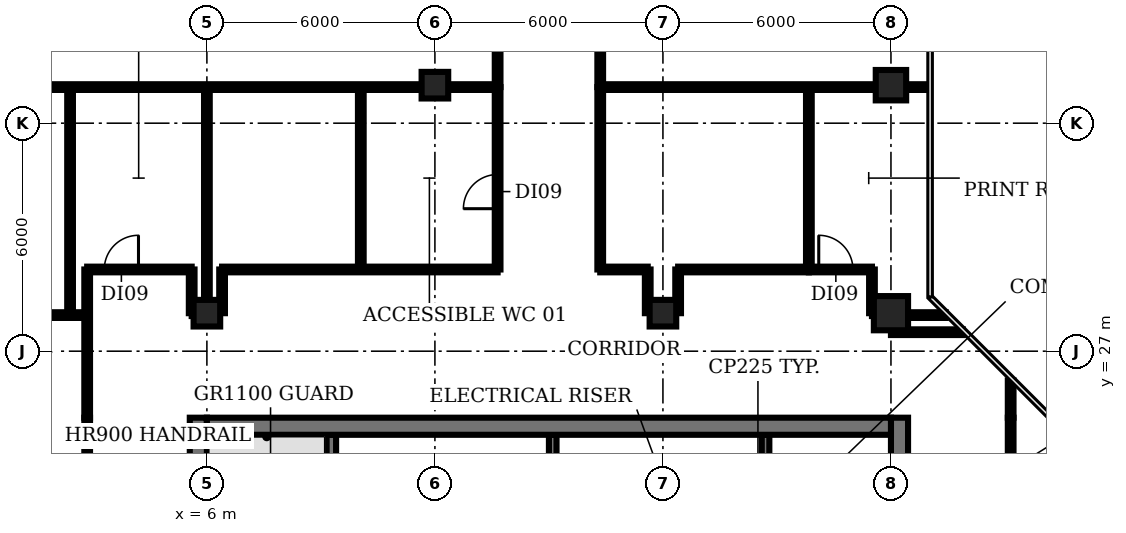
"""IFC4 building model, lengths in metres.
Left out: names, types, materials, properties, quantities, classifications, styles, units other than length and angle.
Written with IfcOpenShell. Run it as: python <this file> out.ifc"""

import sys

from ifc_helpers import new_model, si_unit, direction, frame, frame_2d, origin, origin_2d, place, context, subcontext, project, spatial, rectangle, circle, extrude, element, fill, save


model = new_model("IFC4")
c1 = context("Model", 3, precision=1e-05, world=origin(), true_north=direction((0.0, 1.0)))
c2 = subcontext(c1, "Body", "Model", "MODEL_VIEW")
j1 = project(units=[si_unit("LENGTHUNIT", "METRE"), si_unit("PLANEANGLEUNIT", "RADIAN")], contexts=[c1])
p1 = place(None, origin())
s1 = spatial("IfcSite", under=j1, at=p1, CompositionType="ELEMENT")
p2 = place(p1, origin())
s2 = spatial("IfcBuilding", under=s1, at=p2, CompositionType="ELEMENT")
p3 = place(p2, frame((0.0, 0.0, 247.4)))
s3 = spatial("IfcBuildingStorey", under=s2, at=p3, CompositionType="ELEMENT", Elevation=247.4)
for number, where, z_axis, x_axis in (
    (1, (6.0, 28.0, 0.0), (0.0, 0.0, 1.0), (1.0, 0.0, 0.0)),
    (2, (12.0, 34.0, 0.0), (0.0, 0.0, 1.0), (1.0, 0.0, 0.0)),
    (3, (18.0, 28.0, 0.0), (0.0, 0.0, 1.0), (1.0, 0.0, 0.0)),
):
    element("IfcColumn", number, at=place(p3, frame(where, z_axis=z_axis, x_axis=x_axis)), inside=s3, PredefinedType="COLUMN", context=c2, shape_type="SweptSolid", body=[
        extrude(rectangle(XDim=0.7, YDim=0.7, at=origin_2d()), origin(), (0.0, 0.0, 1.0), 3.85),
    ])
p4 = place(p3, frame((24.0, 28.0, 0.0), z_axis=(0.0, 0.0, 1.0), x_axis=(1.0, 0.0, 0.0)))
e4 = element("IfcColumn", 4, at=p4, inside=s3, PredefinedType="COLUMN", context=c2, shape_type="SweptSolid", body=[
    extrude(circle(Radius=0.45, at=origin_2d()), origin(), (0.0, 0.0, 1.0), 3.85),
])
p5 = place(p3, frame((24.0, 34.0, 0.0), z_axis=(0.0, 0.0, 1.0), x_axis=(1.0, 0.0, 0.0)))
e5 = element("IfcColumn", 5, at=p5, inside=s3, PredefinedType="COLUMN", context=c2, shape_type="SweptSolid", body=[
    extrude(rectangle(XDim=0.8, YDim=0.8, at=origin_2d()), origin(), (0.0, 0.0, 1.0), 3.85),
])
p6 = place(p3, frame((9.275, 18.375, 0.0), z_axis=(0.0, 0.0, 1.0), x_axis=(0.0, 1.0, 0.0)))
e6 = element("IfcWall", 6, at=p6, inside=s3, PredefinedType="SHEAR", context=c2, shape_type="SweptSolid", body=[
    extrude(rectangle(XDim=6.425, YDim=0.25, at=frame_2d((3.212, 0.0))), origin(), (0.0, 0.0, 1.0), 3.85),
])
for number, where, z_axis, x_axis in (
    (7, (15.1, 22.9, 0.0), (0.0, 0.0, 1.0), (0.0, 1.0, 0.0)),
    (8, (20.7, 22.9, 0.0), (0.0, 0.0, 1.0), (0.0, 1.0, 0.0)),
):
    element("IfcWall", number, at=place(p3, frame(where, z_axis=z_axis, x_axis=x_axis)), inside=s3, PredefinedType="SHEAR", context=c2, shape_type="SweptSolid", body=[
        extrude(rectangle(XDim=1.9, YDim=0.2, at=frame_2d((0.95, 0.0))), origin(), (0.0, 0.0, 1.0), 3.85),
    ])
p7 = place(p3, frame((5.775, 4.42, 0.0), z_axis=(0.0, 0.0, 1.0), x_axis=(0.0, 1.0, 0.0)))
e9 = element("IfcWall", 9, at=p7, inside=s3, PredefinedType="SHEAR", context=c2, shape_type="SweptSolid", body=[
    extrude(rectangle(XDim=20.83, YDim=0.45, at=frame_2d((10.415, 0.0))), origin(), (0.0, 0.0, 1.0), 3.85),
])
p8 = place(p7, frame((1.23, 0.0, 0.0)))
e10 = element("IfcOpeningElement", 10, at=p8, cuts=e9, PredefinedType="OPENING", context=c2, shape_type="SweptSolid", body=[
    extrude(rectangle(XDim=1.5, YDim=2.1, at=frame_2d((0.75, 1.05))), frame((0.0, 0.235, 0.0), z_axis=(0.0, -1.0, 0.0), x_axis=(1.0, 0.0, 0.0)), (0.0, 0.0, 1.0), 0.47),
])
p9 = place(p7, frame((7.68, 0.0, 0.0)))
e11 = element("IfcOpeningElement", 11, at=p9, cuts=e9, PredefinedType="OPENING", context=c2, shape_type="SweptSolid", body=[
    extrude(rectangle(XDim=1.2, YDim=2.1, at=frame_2d((0.6, 1.05))), frame((0.0, 0.235, 0.0), z_axis=(0.0, -1.0, 0.0), x_axis=(1.0, 0.0, 0.0)), (0.0, 0.0, 1.0), 0.47),
])
p10 = place(p7, frame((14.23, 0.0, 0.0)))
e12 = element("IfcOpeningElement", 12, at=p10, cuts=e9, PredefinedType="OPENING", context=c2, shape_type="SweptSolid", body=[
    extrude(rectangle(XDim=1.2, YDim=2.1, at=frame_2d((0.6, 1.05))), frame((0.0, 0.235, 0.0), z_axis=(0.0, -1.0, 0.0), x_axis=(1.0, 0.0, 0.0)), (0.0, 0.0, 1.0), 0.47),
])
p11 = place(p3, frame((24.225, 25.25, 0.0), z_axis=(0.0, 0.0, 1.0), x_axis=(0.0, -1.0, 0.0)))
e13 = element("IfcWall", 13, at=p11, inside=s3, PredefinedType="SHEAR", context=c2, shape_type="SweptSolid", body=[
    extrude(rectangle(XDim=20.83, YDim=0.45, at=frame_2d((10.415, 0.0))), origin(), (0.0, 0.0, 1.0), 3.85),
])
p12 = place(p11, frame((18.1, 0.0, 0.0)))
e14 = element("IfcOpeningElement", 14, at=p12, cuts=e13, PredefinedType="OPENING", context=c2, shape_type="SweptSolid", body=[
    extrude(rectangle(XDim=1.5, YDim=2.1, at=frame_2d((0.75, 1.05))), frame((0.0, 0.235, 0.0), z_axis=(0.0, -1.0, 0.0), x_axis=(1.0, 0.0, 0.0)), (0.0, 0.0, 1.0), 0.47),
])
p13 = place(p11, frame((12.0, 0.0, 0.0)))
e15 = element("IfcOpeningElement", 15, at=p13, cuts=e13, PredefinedType="OPENING", context=c2, shape_type="SweptSolid", body=[
    extrude(rectangle(XDim=0.9, YDim=2.1, at=frame_2d((0.45, 1.05))), frame((0.0, 0.235, 0.0), z_axis=(0.0, -1.0, 0.0), x_axis=(1.0, 0.0, 0.0)), (0.0, 0.0, 1.0), 0.47),
])
p14 = place(p11, frame((6.0, 0.0, 0.0)))
e16 = element("IfcOpeningElement", 16, at=p14, cuts=e13, PredefinedType="OPENING", context=c2, shape_type="SweptSolid", body=[
    extrude(rectangle(XDim=2.0, YDim=2.1, at=frame_2d((1.0, 1.05))), frame((0.0, 0.235, 0.0), z_axis=(0.0, -1.0, 0.0), x_axis=(1.0, 0.0, 0.0)), (0.0, 0.0, 1.0), 0.47),
])
p15 = place(p3, frame((6.0, 25.025, 0.0), z_axis=(0.0, 0.0, 1.0), x_axis=(1.0, 0.0, 0.0)))
e17 = element("IfcWall", 17, at=p15, inside=s3, PredefinedType="SHEAR", context=c2, shape_type="SweptSolid", body=[
    extrude(rectangle(XDim=18.0, YDim=0.45, at=frame_2d((9.0, 0.0))), origin(), (0.0, 0.0, 1.0), 3.85),
])
p16 = place(p3, frame((-1.69, 27.95, 0.0), z_axis=(0.0, 0.0, 1.0), x_axis=(1.0, 0.0, 0.0)))
e18 = element("IfcWall", 18, at=p16, inside=s3, PredefinedType="PARTITIONING", context=c2, shape_type="SweptSolid", body=[
    extrude(rectangle(XDim=4.54, YDim=0.15, at=frame_2d((2.27, 0.0))), origin(), (0.0, 0.0, 1.0), 2.88),
])
p17 = place(p3, frame((-1.22, 33.95, 0.0), z_axis=(0.0, 0.0, 1.0), x_axis=(1.0, 0.0, 0.0)))
e19 = element("IfcWall", 19, at=p17, inside=s3, PredefinedType="PARTITIONING", context=c2, shape_type="SweptSolid", body=[
    extrude(rectangle(XDim=14.87, YDim=0.15, at=frame_2d((7.435, 0.0))), origin(), (0.0, 0.0, 1.0), 2.88),
])
p18 = place(p3, frame((2.4, 27.95, 0.0), z_axis=(0.0, 0.0, 1.0), x_axis=(0.0, 1.0, 0.0)))
e20 = element("IfcWall", 20, at=p18, inside=s3, PredefinedType="PARTITIONING", context=c2, shape_type="SweptSolid", body=[
    extrude(rectangle(XDim=6.0, YDim=0.15, at=frame_2d((3.0, 0.0))), origin(), (0.0, 0.0, 1.0), 2.88),
])
p19 = place(p3, frame((2.85, 3.96, 0.0), z_axis=(0.0, 0.0, 1.0), x_axis=(0.0, 1.0, 0.0)))
e21 = element("IfcWall", 21, at=p19, inside=s3, PredefinedType="PARTITIONING", context=c2, shape_type="SweptSolid", body=[
    extrude(rectangle(XDim=21.29, YDim=0.15, at=frame_2d((10.645, 0.0))), origin(), (0.0, 0.0, 1.0), 2.88),
])
p20 = place(p19, frame((9.99, 0.0, 0.0)))
e22 = element("IfcOpeningElement", 22, at=p20, cuts=e21, PredefinedType="OPENING", context=c2, shape_type="SweptSolid", body=[
    extrude(rectangle(XDim=1.2, YDim=2.1, at=frame_2d((0.6, 1.05))), frame((0.0, 0.085, 0.0), z_axis=(0.0, -1.0, 0.0), x_axis=(1.0, 0.0, 0.0)), (0.0, 0.0, 1.0), 0.17),
])
p21 = place(p3, frame((2.85, 25.25, 0.0), z_axis=(0.0, 0.0, 1.0), x_axis=(0.0, 1.0, 0.0)))
e23 = element("IfcWall", 23, at=p21, inside=s3, PredefinedType="PARTITIONING", context=c2, shape_type="SweptSolid", body=[
    extrude(rectangle(XDim=3.9, YDim=0.15, at=frame_2d((1.95, 0.0))), origin(), (0.0, 0.0, 1.0), 2.88),
])
p22 = place(p3, frame((2.85, 29.15, 0.0), z_axis=(0.0, 0.0, 1.0), x_axis=(1.0, 0.0, 0.0)))
e24 = element("IfcWall", 24, at=p22, inside=s3, PredefinedType="PARTITIONING", context=c2, shape_type="SweptSolid", body=[
    extrude(rectangle(XDim=2.75, YDim=0.15, at=frame_2d((1.375, 0.0))), origin(), (0.0, 0.0, 1.0), 2.88),
])
p23 = place(p22, frame((0.45, 0.0, 0.0)))
e25 = element("IfcOpeningElement", 25, at=p23, cuts=e24, PredefinedType="OPENING", context=c2, shape_type="SweptSolid", body=[
    extrude(rectangle(XDim=0.9, YDim=2.1, at=frame_2d((0.45, 1.05))), frame((0.0, 0.085, 0.0), z_axis=(0.0, -1.0, 0.0), x_axis=(1.0, 0.0, 0.0)), (0.0, 0.0, 1.0), 0.17),
])
p24 = place(p3, frame((5.6, 28.0, 0.0), z_axis=(0.0, 0.0, 1.0), x_axis=(0.0, 1.0, 0.0)))
e26 = element("IfcWall", 26, at=p24, inside=s3, PredefinedType="PARTITIONING", context=c2, shape_type="SweptSolid", body=[
    extrude(rectangle(XDim=1.15, YDim=0.15, at=frame_2d((0.575, 0.0))), origin(), (0.0, 0.0, 1.0), 2.88),
])
p25 = place(p3, frame((5.6, 28.0, 0.0), z_axis=(0.0, 0.0, 1.0), x_axis=(1.0, 0.0, 0.0)))
e27 = element("IfcWall", 27, at=p25, inside=s3, PredefinedType="PARTITIONING", context=c2, shape_type="SweptSolid", body=[
    extrude(rectangle(XDim=0.4, YDim=0.15, at=frame_2d((0.2, 0.0))), origin(), (0.0, 0.0, 1.0), 2.88),
])
p26 = place(p3, frame((6.0, 28.0, 0.0), z_axis=(0.0, 0.0, 1.0), x_axis=(0.0, 1.0, 0.0)))
e28 = element("IfcWall", 28, at=p26, inside=s3, PredefinedType="PARTITIONING", context=c2, shape_type="SweptSolid", body=[
    extrude(rectangle(XDim=5.95, YDim=0.15, at=frame_2d((2.975, 0.0))), origin(), (0.0, 0.0, 1.0), 2.88),
])
p27 = place(p3, frame((6.4, 28.0, 0.0), z_axis=(0.0, 0.0, 1.0), x_axis=(0.0, 1.0, 0.0)))
e29 = element("IfcWall", 29, at=p27, inside=s3, PredefinedType="PARTITIONING", context=c2, shape_type="SweptSolid", body=[
    extrude(rectangle(XDim=1.15, YDim=0.15, at=frame_2d((0.575, 0.0))), origin(), (0.0, 0.0, 1.0), 2.88),
])
p28 = place(p3, frame((6.4, 29.15, 0.0), z_axis=(0.0, 0.0, 1.0), x_axis=(1.0, 0.0, 0.0)))
e30 = element("IfcWall", 30, at=p28, inside=s3, PredefinedType="PARTITIONING", context=c2, shape_type="SweptSolid", body=[
    extrude(rectangle(XDim=7.25, YDim=0.15, at=frame_2d((3.625, 0.0))), origin(), (0.0, 0.0, 1.0), 2.88),
])
p29 = place(p3, frame((10.05, 29.15, 0.0), z_axis=(0.0, 0.0, 1.0), x_axis=(0.0, 1.0, 0.0)))
e31 = element("IfcWall", 31, at=p29, inside=s3, PredefinedType="PARTITIONING", context=c2, shape_type="SweptSolid", body=[
    extrude(rectangle(XDim=4.8, YDim=0.15, at=frame_2d((2.4, 0.0))), origin(), (0.0, 0.0, 1.0), 2.88),
])
p30 = place(p3, frame((13.65, 29.15, 0.0), z_axis=(0.0, 0.0, 1.0), x_axis=(0.0, 1.0, 0.0)))
e32 = element("IfcWall", 32, at=p30, inside=s3, PredefinedType="PARTITIONING", context=c2, shape_type="SweptSolid", body=[
    extrude(rectangle(XDim=4.8, YDim=0.15, at=frame_2d((2.4, 0.0))), origin(), (0.0, 0.0, 1.0), 2.88),
])
p31 = place(p30, frame((1.6, 0.0, 0.0)))
e33 = element("IfcOpeningElement", 33, at=p31, cuts=e32, PredefinedType="OPENING", context=c2, shape_type="SweptSolid", body=[
    extrude(rectangle(XDim=0.9, YDim=2.1, at=frame_2d((0.45, 1.05))), frame((0.0, 0.085, 0.0), z_axis=(0.0, -1.0, 0.0), x_axis=(1.0, 0.0, 0.0)), (0.0, 0.0, 1.0), 0.17),
])
p32 = place(p3, frame((13.65, 33.95, 0.0), z_axis=(0.0, 0.0, 1.0), x_axis=(0.0, 1.0, 0.0)))
e34 = element("IfcWall", 34, at=p32, inside=s3, PredefinedType="PARTITIONING", context=c2, shape_type="SweptSolid", body=[
    extrude(rectangle(XDim=5.05, YDim=0.15, at=frame_2d((2.525, 0.0))), origin(), (0.0, 0.0, 1.0), 2.88),
])
p33 = place(p32, frame((2.35, 0.0, 0.0)))
e35 = element("IfcOpeningElement", 35, at=p33, cuts=e34, PredefinedType="OPENING", context=c2, shape_type="SweptSolid", body=[
    extrude(rectangle(XDim=1.0, YDim=2.1, at=frame_2d((0.5, 1.05))), frame((0.0, 0.085, 0.0), z_axis=(0.0, -1.0, 0.0), x_axis=(1.0, 0.0, 0.0)), (0.0, 0.0, 1.0), 0.17),
])
p34 = place(p3, frame((16.35, 29.15, 0.0), z_axis=(0.0, 0.0, 1.0), x_axis=(0.0, 1.0, 0.0)))
e36 = element("IfcWall", 36, at=p34, inside=s3, PredefinedType="PARTITIONING", context=c2, shape_type="SweptSolid", body=[
    extrude(rectangle(XDim=4.8, YDim=0.15, at=frame_2d((2.4, 0.0))), origin(), (0.0, 0.0, 1.0), 2.88),
])
p35 = place(p3, frame((16.35, 29.15, 0.0), z_axis=(0.0, 0.0, 1.0), x_axis=(1.0, 0.0, 0.0)))
e37 = element("IfcWall", 37, at=p35, inside=s3, PredefinedType="PARTITIONING", context=c2, shape_type="SweptSolid", body=[
    extrude(rectangle(XDim=1.25, YDim=0.15, at=frame_2d((0.625, 0.0))), origin(), (0.0, 0.0, 1.0), 2.88),
])
p36 = place(p3, frame((16.35, 33.95, 0.0), z_axis=(0.0, 0.0, 1.0), x_axis=(1.0, 0.0, 0.0)))
e38 = element("IfcWall", 38, at=p36, inside=s3, PredefinedType="PARTITIONING", context=c2, shape_type="SweptSolid", body=[
    extrude(rectangle(XDim=8.63, YDim=0.15, at=frame_2d((4.315, 0.0))), origin(), (0.0, 0.0, 1.0), 2.88),
])
p37 = place(p3, frame((16.35, 39.0, 0.0), z_axis=(0.0, 0.0, 1.0), x_axis=(0.0, -1.0, 0.0)))
e39 = element("IfcWall", 39, at=p37, inside=s3, PredefinedType="PARTITIONING", context=c2, shape_type="SweptSolid", body=[
    extrude(rectangle(XDim=5.05, YDim=0.15, at=frame_2d((2.525, 0.0))), origin(), (0.0, 0.0, 1.0), 2.88),
])
p38 = place(p37, frame((2.05, 0.0, 0.0)))
e40 = element("IfcOpeningElement", 40, at=p38, cuts=e39, PredefinedType="OPENING", context=c2, shape_type="SweptSolid", body=[
    extrude(rectangle(XDim=1.0, YDim=2.1, at=frame_2d((0.5, 1.05))), frame((0.0, 0.085, 0.0), z_axis=(0.0, -1.0, 0.0), x_axis=(1.0, 0.0, 0.0)), (0.0, 0.0, 1.0), 0.17),
])
for number, where, z_axis, x_axis in (
    (41, (17.6, 28.0, 0.0), (0.0, 0.0, 1.0), (0.0, 1.0, 0.0)),
    (42, (18.4, 28.0, 0.0), (0.0, 0.0, 1.0), (0.0, 1.0, 0.0)),
):
    element("IfcWall", number, at=place(p3, frame(where, z_axis=z_axis, x_axis=x_axis)), inside=s3, PredefinedType="PARTITIONING", context=c2, shape_type="SweptSolid", body=[
        extrude(rectangle(XDim=1.15, YDim=0.15, at=frame_2d((0.575, 0.0))), origin(), (0.0, 0.0, 1.0), 2.88),
    ])
p39 = place(p3, frame((18.4, 29.15, 0.0), z_axis=(0.0, 0.0, 1.0), x_axis=(1.0, 0.0, 0.0)))
e43 = element("IfcWall", 43, at=p39, inside=s3, PredefinedType="PARTITIONING", context=c2, shape_type="SweptSolid", body=[
    extrude(rectangle(XDim=3.44, YDim=0.15, at=frame_2d((1.72, 0.0))), origin(), (0.0, 0.0, 1.0), 2.88),
])
p40 = place(p3, frame((21.84, 29.15, 0.0), z_axis=(0.0, 0.0, 1.0), x_axis=(0.0, 1.0, 0.0)))
e44 = element("IfcWall", 44, at=p40, inside=s3, PredefinedType="PARTITIONING", context=c2, shape_type="SweptSolid", body=[
    extrude(rectangle(XDim=4.8, YDim=0.15, at=frame_2d((2.4, 0.0))), origin(), (0.0, 0.0, 1.0), 2.88),
])
p41 = place(p3, frame((21.84, 29.15, 0.0), z_axis=(0.0, 0.0, 1.0), x_axis=(1.0, 0.0, 0.0)))
e45 = element("IfcWall", 45, at=p41, inside=s3, PredefinedType="PARTITIONING", context=c2, shape_type="SweptSolid", body=[
    extrude(rectangle(XDim=1.66, YDim=0.15, at=frame_2d((0.83, 0.0))), origin(), (0.0, 0.0, 1.0), 2.88),
])
p42 = place(p41, frame((0.26, 0.0, 0.0)))
e46 = element("IfcOpeningElement", 46, at=p42, cuts=e45, PredefinedType="OPENING", context=c2, shape_type="SweptSolid", body=[
    extrude(rectangle(XDim=0.9, YDim=2.1, at=frame_2d((0.45, 1.05))), frame((0.0, 0.085, 0.0), z_axis=(0.0, -1.0, 0.0), x_axis=(1.0, 0.0, 0.0)), (0.0, 0.0, 1.0), 0.17),
])
p43 = place(p3, frame((23.5, 28.0, 0.0), z_axis=(0.0, 0.0, 1.0), x_axis=(0.0, 1.0, 0.0)))
e47 = element("IfcWall", 47, at=p43, inside=s3, PredefinedType="PARTITIONING", context=c2, shape_type="SweptSolid", body=[
    extrude(rectangle(XDim=1.15, YDim=0.15, at=frame_2d((0.575, 0.0))), origin(), (0.0, 0.0, 1.0), 2.88),
])
p44 = place(p3, frame((23.5, 28.0, 0.0), z_axis=(0.0, 0.0, 1.0), x_axis=(1.0, 0.0, 0.0)))
e48 = element("IfcWall", 48, at=p44, inside=s3, PredefinedType="PARTITIONING", context=c2, shape_type="SweptSolid", body=[
    extrude(rectangle(XDim=0.5, YDim=0.15, at=frame_2d((0.25, 0.0))), origin(), (0.0, 0.0, 1.0), 2.88),
])
p45 = place(p3, frame((24.0, 27.5, 0.0), z_axis=(0.0, 0.0, 1.0), x_axis=(1.0, 0.0, 0.0)))
e49 = element("IfcWall", 49, at=p45, inside=s3, PredefinedType="PARTITIONING", context=c2, shape_type="SweptSolid", body=[
    extrude(rectangle(XDim=1.89, YDim=0.15, at=frame_2d((0.945, 0.0))), origin(), (0.0, 0.0, 1.0), 2.88),
])
p46 = place(p3, frame((24.0, 27.95, 0.0), z_axis=(0.0, 0.0, 1.0), x_axis=(1.0, 0.0, 0.0)))
e50 = element("IfcWall", 50, at=p46, inside=s3, PredefinedType="PARTITIONING", context=c2, shape_type="SweptSolid", body=[
    extrude(rectangle(XDim=1.44, YDim=0.15, at=frame_2d((0.72, 0.0))), origin(), (0.0, 0.0, 1.0), 2.88),
])
p47 = place(p3, frame((27.15, 20.4, 0.0), z_axis=(0.0, 0.0, 1.0), x_axis=(0.0, 1.0, 0.0)))
e51 = element("IfcWall", 51, at=p47, inside=s3, PredefinedType="PARTITIONING", context=c2, shape_type="SweptSolid", body=[
    extrude(rectangle(XDim=4.85, YDim=0.15, at=frame_2d((2.425, 0.0))), origin(), (0.0, 0.0, 1.0), 2.88),
])
p48 = place(p47, frame((1.7, 0.0, 0.0)))
e52 = element("IfcOpeningElement", 52, at=p48, cuts=e51, PredefinedType="OPENING", context=c2, shape_type="SweptSolid", body=[
    extrude(rectangle(XDim=1.8, YDim=2.1, at=frame_2d((0.9, 1.05))), frame((0.0, 0.085, 0.0), z_axis=(0.0, -1.0, 0.0), x_axis=(1.0, 0.0, 0.0)), (0.0, 0.0, 1.0), 0.17),
])
p49 = place(p3, frame((27.15, 25.25, 0.0), z_axis=(0.0, 0.0, 1.0), x_axis=(0.0, 1.0, 0.0)))
e53 = element("IfcWall", 53, at=p49, inside=s3, PredefinedType="PARTITIONING", context=c2, shape_type="SweptSolid", body=[
    extrude(rectangle(XDim=0.98, YDim=0.15, at=frame_2d((0.49, 0.0))), origin(), (0.0, 0.0, 1.0), 2.88),
])
p50 = place(p23, origin())
e54 = element("IfcDoor", 54, at=p50, inside=s3, OperationType="SINGLE_SWING_RIGHT", PredefinedType="DOOR", context=c2, shape_type="SweptSolid", body=[
    extrude(rectangle(XDim=0.9, YDim=2.1, at=frame_2d((0.45, 1.05))), frame((0.0, 0.025, 0.0), z_axis=(0.0, -1.0, 0.0), x_axis=(1.0, 0.0, 0.0)), (0.0, 0.0, 1.0), 0.05),
])
fill(e25, e54)
p51 = place(p31, origin())
e55 = element("IfcDoor", 55, at=p51, inside=s3, OperationType="SINGLE_SWING_LEFT", PredefinedType="DOOR", context=c2, shape_type="SweptSolid", body=[
    extrude(rectangle(XDim=0.9, YDim=2.1, at=frame_2d((0.45, 1.05))), frame((0.0, 0.025, 0.0), z_axis=(0.0, -1.0, 0.0), x_axis=(1.0, 0.0, 0.0)), (0.0, 0.0, 1.0), 0.05),
])
fill(e33, e55)
p52 = place(p42, origin())
e56 = element("IfcDoor", 56, at=p52, inside=s3, OperationType="SINGLE_SWING_LEFT", PredefinedType="DOOR", context=c2, shape_type="SweptSolid", body=[
    extrude(rectangle(XDim=0.9, YDim=2.1, at=frame_2d((0.45, 1.05))), frame((0.0, 0.025, 0.0), z_axis=(0.0, -1.0, 0.0), x_axis=(1.0, 0.0, 0.0)), (0.0, 0.0, 1.0), 0.05),
])
fill(e46, e56)
save(model, sys.argv[1])
